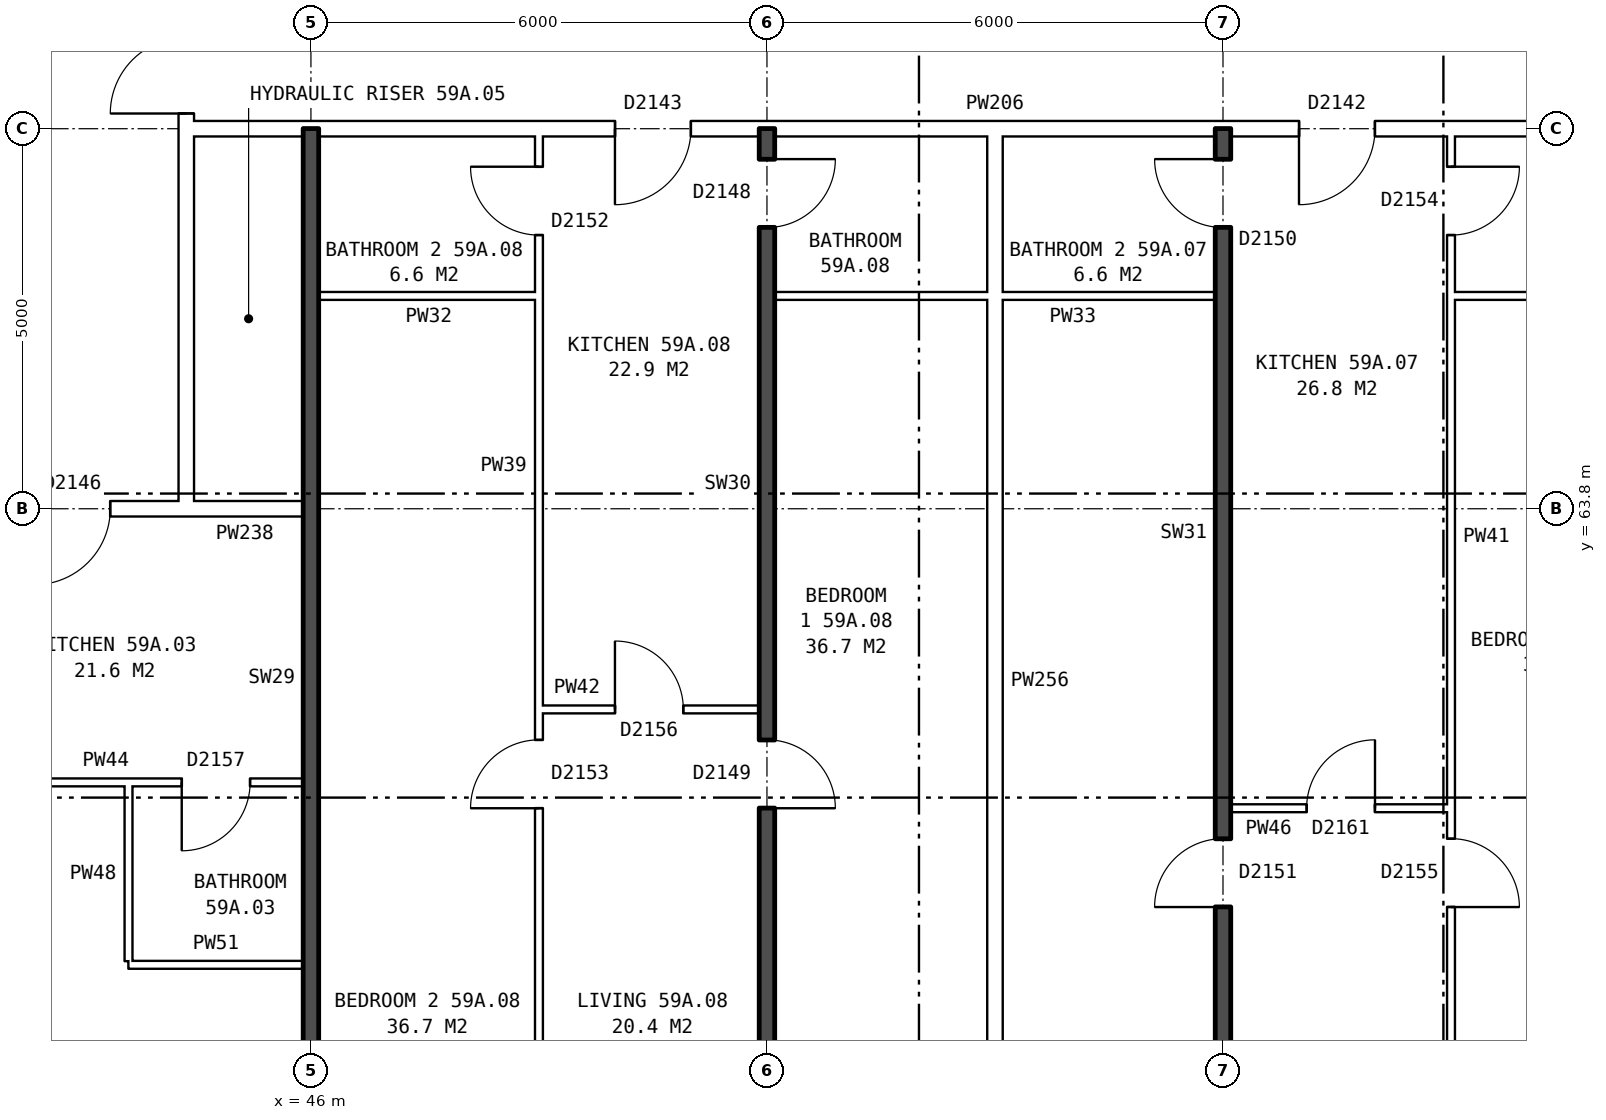
"""IFC4 building model, lengths in metres.
Left out: names, types, materials, properties, quantities, classifications, styles, units other than length and angle.
Written with IfcOpenShell. Run it as: python <this file> out.ifc"""

import sys

from ifc_helpers import new_model, si_unit, direction, frame, frame_2d, origin, place, context, subcontext, project, spatial, rectangle, extrude, element, fill, save


model = new_model("IFC4")
c1 = context("Model", 3, precision=1e-05, world=origin(), true_north=direction((0.0, 1.0)))
c2 = subcontext(c1, "Body", "Model", "MODEL_VIEW")
j1 = project(units=[si_unit("LENGTHUNIT", "METRE"), si_unit("PLANEANGLEUNIT", "RADIAN")], contexts=[c1])
p1 = place(None, origin())
s1 = spatial("IfcSite", under=j1, at=p1, CompositionType="ELEMENT")
p2 = place(p1, origin())
s2 = spatial("IfcBuilding", under=s1, at=p2, CompositionType="ELEMENT")
p3 = place(p2, frame((0.0, 0.0, 209.0)))
s3 = spatial("IfcBuildingStorey", under=s2, at=p3, CompositionType="ELEMENT", Elevation=209.0)
p4 = place(p3, frame((44.36, 63.9, 0.0), z_axis=(0.0, 0.0, 1.0), x_axis=(0.0, 1.0, 0.0)))
e1 = element("IfcWall", 1, at=p4, inside=s3, PredefinedType="PARTITIONING", context=c2, shape_type="SweptSolid", body=[
    extrude(rectangle(XDim=12.2, YDim=0.2, at=frame_2d((6.1, 0.0))), origin(), (0.0, 0.0, 1.0), 2.85),
])
p5 = place(p4, frame((5.1, 0.0, 0.0)))
e2 = element("IfcOpeningElement", 2, at=p5, cuts=e1, PredefinedType="OPENING", context=c2, shape_type="SweptSolid", body=[
    extrude(rectangle(XDim=2.0, YDim=2.1, at=frame_2d((1.0, 1.05))), frame((0.0, 0.11, 0.0), z_axis=(0.0, -1.0, 0.0), x_axis=(1.0, 0.0, 0.0)), (0.0, 0.0, 1.0), 0.22),
])
p6 = place(p3, frame((43.6, 57.8, 0.0), z_axis=(0.0, 0.0, 1.0), x_axis=(1.0, 0.0, 0.0)))
e3 = element("IfcWall", 3, at=p6, inside=s3, PredefinedType="PARTITIONING", context=c2, shape_type="SweptSolid", body=[
    extrude(rectangle(XDim=2.3, YDim=0.1, at=frame_2d((1.15, 0.0))), origin(), (0.0, 0.0, 1.0), 2.85),
])
p7 = place(p3, frame((58.1, 59.86, 0.0), z_axis=(0.0, 0.0, 1.0), x_axis=(1.0, 0.0, 0.0)))
e4 = element("IfcWall", 4, at=p7, inside=s3, PredefinedType="PARTITIONING", context=c2, shape_type="SweptSolid", body=[
    extrude(rectangle(XDim=2.9, YDim=0.1, at=frame_2d((1.45, 0.0))), origin(), (0.0, 0.0, 1.0), 2.85),
])
p8 = place(p7, frame((1.0, 0.0, 0.0)))
e5 = element("IfcOpeningElement", 5, at=p8, cuts=e4, PredefinedType="OPENING", context=c2, shape_type="SweptSolid", body=[
    extrude(rectangle(XDim=0.9, YDim=2.1, at=frame_2d((0.45, 1.05))), frame((0.0, 0.06, 0.0), z_axis=(0.0, -1.0, 0.0), x_axis=(1.0, 0.0, 0.0)), (0.0, 0.0, 1.0), 0.12),
])
p9 = place(p3, frame((40.1, 60.2, 0.0), z_axis=(0.0, 0.0, 1.0), x_axis=(1.0, 0.0, 0.0)))
e6 = element("IfcWall", 6, at=p9, inside=s3, PredefinedType="PARTITIONING", context=c2, shape_type="SweptSolid", body=[
    extrude(rectangle(XDim=5.8, YDim=0.1, at=frame_2d((2.9, 0.0))), origin(), (0.0, 0.0, 1.0), 2.85),
])
p10 = place(p9, frame((1.3, 0.0, 0.0)))
e7 = element("IfcOpeningElement", 7, at=p10, cuts=e6, PredefinedType="OPENING", context=c2, shape_type="SweptSolid", body=[
    extrude(rectangle(XDim=0.9, YDim=2.1, at=frame_2d((0.45, 1.05))), frame((0.0, 0.06, 0.0), z_axis=(0.0, -1.0, 0.0), x_axis=(1.0, 0.0, 0.0)), (0.0, 0.0, 1.0), 0.12),
])
p11 = place(p9, frame((4.2, 0.0, 0.0)))
e8 = element("IfcOpeningElement", 8, at=p11, cuts=e6, PredefinedType="OPENING", context=c2, shape_type="SweptSolid", body=[
    extrude(rectangle(XDim=0.9, YDim=2.1, at=frame_2d((0.45, 1.05))), frame((0.0, 0.06, 0.0), z_axis=(0.0, -1.0, 0.0), x_axis=(1.0, 0.0, 0.0)), (0.0, 0.0, 1.0), 0.12),
])
p12 = place(p3, frame((49.0, 61.16, 0.0), z_axis=(0.0, 0.0, 1.0), x_axis=(1.0, 0.0, 0.0)))
e9 = element("IfcWall", 9, at=p12, inside=s3, PredefinedType="PARTITIONING", context=c2, shape_type="SweptSolid", body=[
    extrude(rectangle(XDim=2.9, YDim=0.1, at=frame_2d((1.45, 0.0))), origin(), (0.0, 0.0, 1.0), 2.85),
])
p13 = place(p12, frame((1.0, 0.0, 0.0)))
e10 = element("IfcOpeningElement", 10, at=p13, cuts=e9, PredefinedType="OPENING", context=c2, shape_type="SweptSolid", body=[
    extrude(rectangle(XDim=0.9, YDim=2.1, at=frame_2d((0.45, 1.05))), frame((0.0, 0.06, 0.0), z_axis=(0.0, -1.0, 0.0), x_axis=(1.0, 0.0, 0.0)), (0.0, 0.0, 1.0), 0.12),
])
p14 = place(p3, frame((41.36, 63.8, 0.0), z_axis=(0.0, 0.0, 1.0), x_axis=(1.0, 0.0, 0.0)))
e11 = element("IfcWall", 11, at=p14, inside=s3, PredefinedType="PARTITIONING", context=c2, shape_type="SweptSolid", body=[
    extrude(rectangle(XDim=3.0, YDim=0.2, at=frame_2d((1.5, 0.0))), origin(), (0.0, 0.0, 1.0), 2.85),
])
p15 = place(p14, frame((1.0, 0.0, 0.0)))
e12 = element("IfcOpeningElement", 12, at=p15, cuts=e11, PredefinedType="OPENING", context=c2, shape_type="SweptSolid", body=[
    extrude(rectangle(XDim=1.0, YDim=2.1, at=frame_2d((0.5, 1.05))), frame((0.0, 0.11, 0.0), z_axis=(0.0, -1.0, 0.0), x_axis=(1.0, 0.0, 0.0)), (0.0, 0.0, 1.0), 0.22),
])
p16 = place(p3, frame((44.36, 63.8, 0.0), z_axis=(0.0, 0.0, 1.0), x_axis=(1.0, 0.0, 0.0)))
e13 = element("IfcWall", 13, at=p16, inside=s3, PredefinedType="PARTITIONING", context=c2, shape_type="SweptSolid", body=[
    extrude(rectangle(XDim=1.54, YDim=0.2, at=frame_2d((0.77, 0.0))), origin(), (0.0, 0.0, 1.0), 2.85),
])
p17 = place(p3, frame((46.1, 66.6, 0.0), z_axis=(0.0, 0.0, 1.0), x_axis=(1.0, 0.0, 0.0)))
e14 = element("IfcWall", 14, at=p17, inside=s3, PredefinedType="PARTITIONING", context=c2, shape_type="SweptSolid", body=[
    extrude(rectangle(XDim=2.9, YDim=0.1, at=frame_2d((1.45, 0.0))), origin(), (0.0, 0.0, 1.0), 2.85),
])
p18 = place(p3, frame((52.1, 66.6, 0.0), z_axis=(0.0, 0.0, 1.0), x_axis=(1.0, 0.0, 0.0)))
e15 = element("IfcWall", 15, at=p18, inside=s3, PredefinedType="PARTITIONING", context=c2, shape_type="SweptSolid", body=[
    extrude(rectangle(XDim=5.8, YDim=0.1, at=frame_2d((2.9, 0.0))), origin(), (0.0, 0.0, 1.0), 2.85),
])
p19 = place(p3, frame((61.0, 66.6, 0.0), z_axis=(0.0, 0.0, 1.0), x_axis=(1.0, 0.0, 0.0)))
e16 = element("IfcWall", 16, at=p19, inside=s3, PredefinedType="PARTITIONING", context=c2, shape_type="SweptSolid", body=[
    extrude(rectangle(XDim=2.64, YDim=0.1, at=frame_2d((1.32, 0.0))), origin(), (0.0, 0.0, 1.0), 2.85),
])
p20 = place(p3, frame((44.36, 68.8, 0.0), z_axis=(0.0, 0.0, 1.0), x_axis=(1.0, 0.0, 0.0)))
e17 = element("IfcWall", 17, at=p20, inside=s3, PredefinedType="PARTITIONING", context=c2, shape_type="SweptSolid", body=[
    extrude(rectangle(XDim=19.28, YDim=0.2, at=frame_2d((9.64, 0.0))), origin(), (0.0, 0.0, 1.0), 2.85),
])
p21 = place(p20, frame((14.64, 0.0, 0.0)))
e18 = element("IfcOpeningElement", 18, at=p21, cuts=e17, PredefinedType="OPENING", context=c2, shape_type="SweptSolid", body=[
    extrude(rectangle(XDim=1.0, YDim=2.1, at=frame_2d((0.5, 1.05))), frame((0.0, 0.11, 0.0), z_axis=(0.0, -1.0, 0.0), x_axis=(1.0, 0.0, 0.0)), (0.0, 0.0, 1.0), 0.22),
])
p22 = place(p20, frame((5.64, 0.0, 0.0)))
e19 = element("IfcOpeningElement", 19, at=p22, cuts=e17, PredefinedType="OPENING", context=c2, shape_type="SweptSolid", body=[
    extrude(rectangle(XDim=1.0, YDim=2.1, at=frame_2d((0.5, 1.05))), frame((0.0, 0.11, 0.0), z_axis=(0.0, -1.0, 0.0), x_axis=(1.0, 0.0, 0.0)), (0.0, 0.0, 1.0), 0.22),
])
p23 = place(p3, frame((43.6, 57.85, 0.0), z_axis=(0.0, 0.0, 1.0), x_axis=(0.0, 1.0, 0.0)))
e20 = element("IfcWall", 20, at=p23, inside=s3, PredefinedType="PARTITIONING", context=c2, shape_type="SweptSolid", body=[
    extrude(rectangle(XDim=2.3, YDim=0.1, at=frame_2d((1.15, 0.0))), origin(), (0.0, 0.0, 1.0), 2.85),
])
p24 = place(p3, frame((46.0, 54.36, 0.0), z_axis=(0.0, 0.0, 1.0), x_axis=(0.0, 1.0, 0.0)))
e21 = element("IfcWall", 21, at=p24, inside=s3, PredefinedType="SOLIDWALL", context=c2, shape_type="SweptSolid", body=[
    extrude(rectangle(XDim=14.44, YDim=0.2, at=frame_2d((7.22, 0.0))), origin(), (0.0, 0.0, 1.0), 2.85),
])
p25 = place(p3, frame((49.0, 54.36, 0.0), z_axis=(0.0, 0.0, 1.0), x_axis=(0.0, 1.0, 0.0)))
e22 = element("IfcWall", 22, at=p25, inside=s3, PredefinedType="PARTITIONING", context=c2, shape_type="SweptSolid", body=[
    extrude(rectangle(XDim=14.34, YDim=0.1, at=frame_2d((7.17, 0.0))), origin(), (0.0, 0.0, 1.0), 2.85),
])
p26 = place(p25, frame((5.5, 0.0, 0.0)))
e23 = element("IfcOpeningElement", 23, at=p26, cuts=e22, PredefinedType="OPENING", context=c2, shape_type="SweptSolid", body=[
    extrude(rectangle(XDim=0.9, YDim=2.1, at=frame_2d((0.45, 1.05))), frame((0.0, 0.06, 0.0), z_axis=(0.0, -1.0, 0.0), x_axis=(1.0, 0.0, 0.0)), (0.0, 0.0, 1.0), 0.12),
])
p27 = place(p25, frame((13.04, 0.0, 0.0)))
e24 = element("IfcOpeningElement", 24, at=p27, cuts=e22, PredefinedType="OPENING", context=c2, shape_type="SweptSolid", body=[
    extrude(rectangle(XDim=0.9, YDim=2.1, at=frame_2d((0.45, 1.05))), frame((0.0, 0.06, 0.0), z_axis=(0.0, -1.0, 0.0), x_axis=(1.0, 0.0, 0.0)), (0.0, 0.0, 1.0), 0.12),
])
p28 = place(p3, frame((52.0, 54.36, 0.0), z_axis=(0.0, 0.0, 1.0), x_axis=(0.0, 1.0, 0.0)))
e25 = element("IfcWall", 25, at=p28, inside=s3, PredefinedType="SOLIDWALL", context=c2, shape_type="SweptSolid", body=[
    extrude(rectangle(XDim=14.44, YDim=0.2, at=frame_2d((7.22, 0.0))), origin(), (0.0, 0.0, 1.0), 2.85),
])
p29 = place(p28, frame((5.5, 0.0, 0.0)))
e26 = element("IfcOpeningElement", 26, at=p29, cuts=e25, PredefinedType="OPENING", context=c2, shape_type="SweptSolid", body=[
    extrude(rectangle(XDim=0.9, YDim=2.1, at=frame_2d((0.45, 1.05))), frame((0.0, 0.11, 0.0), z_axis=(0.0, -1.0, 0.0), x_axis=(1.0, 0.0, 0.0)), (0.0, 0.0, 1.0), 0.22),
])
p30 = place(p28, frame((13.14, 0.0, 0.0)))
e27 = element("IfcOpeningElement", 27, at=p30, cuts=e25, PredefinedType="OPENING", context=c2, shape_type="SweptSolid", body=[
    extrude(rectangle(XDim=0.9, YDim=2.1, at=frame_2d((0.45, 1.05))), frame((0.0, 0.11, 0.0), z_axis=(0.0, -1.0, 0.0), x_axis=(1.0, 0.0, 0.0)), (0.0, 0.0, 1.0), 0.22),
])
p31 = place(p3, frame((55.0, 54.36, 0.0), z_axis=(0.0, 0.0, 1.0), x_axis=(0.0, 1.0, 0.0)))
e28 = element("IfcWall", 28, at=p31, inside=s3, PredefinedType="PARTITIONING", context=c2, shape_type="SweptSolid", body=[
    extrude(rectangle(XDim=14.34, YDim=0.2, at=frame_2d((7.17, 0.0))), origin(), (0.0, 0.0, 1.0), 2.85),
])
p32 = place(p3, frame((58.0, 54.36, 0.0), z_axis=(0.0, 0.0, 1.0), x_axis=(0.0, 1.0, 0.0)))
e29 = element("IfcWall", 29, at=p32, inside=s3, PredefinedType="SOLIDWALL", context=c2, shape_type="SweptSolid", body=[
    extrude(rectangle(XDim=14.44, YDim=0.2, at=frame_2d((7.22, 0.0))), origin(), (0.0, 0.0, 1.0), 2.85),
])
p33 = place(p32, frame((4.2, 0.0, 0.0)))
e30 = element("IfcOpeningElement", 30, at=p33, cuts=e29, PredefinedType="OPENING", context=c2, shape_type="SweptSolid", body=[
    extrude(rectangle(XDim=0.9, YDim=2.1, at=frame_2d((0.45, 1.05))), frame((0.0, 0.11, 0.0), z_axis=(0.0, -1.0, 0.0), x_axis=(1.0, 0.0, 0.0)), (0.0, 0.0, 1.0), 0.22),
])
p34 = place(p32, frame((13.14, 0.0, 0.0)))
e31 = element("IfcOpeningElement", 31, at=p34, cuts=e29, PredefinedType="OPENING", context=c2, shape_type="SweptSolid", body=[
    extrude(rectangle(XDim=0.9, YDim=2.1, at=frame_2d((0.45, 1.05))), frame((0.0, 0.11, 0.0), z_axis=(0.0, -1.0, 0.0), x_axis=(1.0, 0.0, 0.0)), (0.0, 0.0, 1.0), 0.22),
])
p35 = place(p3, frame((61.0, 54.36, 0.0), z_axis=(0.0, 0.0, 1.0), x_axis=(0.0, 1.0, 0.0)))
e32 = element("IfcWall", 32, at=p35, inside=s3, PredefinedType="PARTITIONING", context=c2, shape_type="SweptSolid", body=[
    extrude(rectangle(XDim=14.34, YDim=0.1, at=frame_2d((7.17, 0.0))), origin(), (0.0, 0.0, 1.0), 2.85),
])
p36 = place(p35, frame((4.2, 0.0, 0.0)))
e33 = element("IfcOpeningElement", 33, at=p36, cuts=e32, PredefinedType="OPENING", context=c2, shape_type="SweptSolid", body=[
    extrude(rectangle(XDim=0.9, YDim=2.1, at=frame_2d((0.45, 1.05))), frame((0.0, 0.06, 0.0), z_axis=(0.0, -1.0, 0.0), x_axis=(1.0, 0.0, 0.0)), (0.0, 0.0, 1.0), 0.12),
])
p37 = place(p35, frame((13.04, 0.0, 0.0)))
e34 = element("IfcOpeningElement", 34, at=p37, cuts=e32, PredefinedType="OPENING", context=c2, shape_type="SweptSolid", body=[
    extrude(rectangle(XDim=0.9, YDim=2.1, at=frame_2d((0.45, 1.05))), frame((0.0, 0.06, 0.0), z_axis=(0.0, -1.0, 0.0), x_axis=(1.0, 0.0, 0.0)), (0.0, 0.0, 1.0), 0.12),
])
p38 = place(p5, origin())
e35 = element("IfcDoor", 35, at=p38, inside=s3, OperationType="DOUBLE_DOOR_SINGLE_SWING", PredefinedType="DOOR", context=c2, shape_type="SweptSolid", body=[
    extrude(rectangle(XDim=2.0, YDim=2.1, at=frame_2d((1.0, 1.05))), frame((0.0, 0.025, 0.0), z_axis=(0.0, -1.0, 0.0), x_axis=(1.0, 0.0, 0.0)), (0.0, 0.0, 1.0), 0.05),
])
fill(e2, e35)
p39 = place(p15, frame((1.0, 0.0, 0.0), z_axis=(0.0, 0.0, 1.0), x_axis=(-1.0, 0.0, 0.0)))
e36 = element("IfcDoor", 36, at=p39, inside=s3, OperationType="SINGLE_SWING_RIGHT", PredefinedType="DOOR", context=c2, shape_type="SweptSolid", body=[
    extrude(rectangle(XDim=1.0, YDim=2.1, at=frame_2d((0.5, 1.05))), frame((0.0, 0.025, 0.0), z_axis=(0.0, -1.0, 0.0), x_axis=(1.0, 0.0, 0.0)), (0.0, 0.0, 1.0), 0.05),
])
fill(e12, e36)
p40 = place(p11, frame((0.9, 0.0, 0.0), z_axis=(0.0, 0.0, 1.0), x_axis=(-1.0, 0.0, 0.0)))
e37 = element("IfcDoor", 37, at=p40, inside=s3, OperationType="SINGLE_SWING_RIGHT", PredefinedType="DOOR", context=c2, shape_type="SweptSolid", body=[
    extrude(rectangle(XDim=0.9, YDim=2.1, at=frame_2d((0.45, 1.05))), frame((0.0, 0.025, 0.0), z_axis=(0.0, -1.0, 0.0), x_axis=(1.0, 0.0, 0.0)), (0.0, 0.0, 1.0), 0.05),
])
fill(e8, e37)
p41 = place(p36, frame((0.9, 0.0, 0.0), z_axis=(0.0, 0.0, 1.0), x_axis=(-1.0, 0.0, 0.0)))
e38 = element("IfcDoor", 38, at=p41, inside=s3, OperationType="SINGLE_SWING_RIGHT", PredefinedType="DOOR", context=c2, shape_type="SweptSolid", body=[
    extrude(rectangle(XDim=0.9, YDim=2.1, at=frame_2d((0.45, 1.05))), frame((0.0, 0.025, 0.0), z_axis=(0.0, -1.0, 0.0), x_axis=(1.0, 0.0, 0.0)), (0.0, 0.0, 1.0), 0.05),
])
fill(e33, e38)
p42 = place(p33, origin())
e39 = element("IfcDoor", 39, at=p42, inside=s3, OperationType="SINGLE_SWING_LEFT", PredefinedType="DOOR", context=c2, shape_type="SweptSolid", body=[
    extrude(rectangle(XDim=0.9, YDim=2.1, at=frame_2d((0.45, 1.05))), frame((0.0, 0.025, 0.0), z_axis=(0.0, -1.0, 0.0), x_axis=(1.0, 0.0, 0.0)), (0.0, 0.0, 1.0), 0.05),
])
fill(e30, e39)
p43 = place(p21, frame((1.0, 0.0, 0.0), z_axis=(0.0, 0.0, 1.0), x_axis=(-1.0, 0.0, 0.0)))
e40 = element("IfcDoor", 40, at=p43, inside=s3, OperationType="SINGLE_SWING_RIGHT", PredefinedType="DOOR", context=c2, shape_type="SweptSolid", body=[
    extrude(rectangle(XDim=1.0, YDim=2.1, at=frame_2d((0.5, 1.05))), frame((0.0, 0.025, 0.0), z_axis=(0.0, -1.0, 0.0), x_axis=(1.0, 0.0, 0.0)), (0.0, 0.0, 1.0), 0.05),
])
fill(e18, e40)
p44 = place(p8, origin())
e41 = element("IfcDoor", 41, at=p44, inside=s3, OperationType="SINGLE_SWING_RIGHT", PredefinedType="DOOR", context=c2, shape_type="SweptSolid", body=[
    extrude(rectangle(XDim=0.9, YDim=2.1, at=frame_2d((0.45, 1.05))), frame((0.0, 0.025, 0.0), z_axis=(0.0, -1.0, 0.0), x_axis=(1.0, 0.0, 0.0)), (0.0, 0.0, 1.0), 0.05),
])
fill(e5, e41)
p45 = place(p37, frame((0.9, 0.0, 0.0), z_axis=(0.0, 0.0, 1.0), x_axis=(-1.0, 0.0, 0.0)))
e42 = element("IfcDoor", 42, at=p45, inside=s3, OperationType="SINGLE_SWING_LEFT", PredefinedType="DOOR", context=c2, shape_type="SweptSolid", body=[
    extrude(rectangle(XDim=0.9, YDim=2.1, at=frame_2d((0.45, 1.05))), frame((0.0, 0.025, 0.0), z_axis=(0.0, -1.0, 0.0), x_axis=(1.0, 0.0, 0.0)), (0.0, 0.0, 1.0), 0.05),
])
fill(e34, e42)
p46 = place(p34, origin())
e43 = element("IfcDoor", 43, at=p46, inside=s3, OperationType="SINGLE_SWING_RIGHT", PredefinedType="DOOR", context=c2, shape_type="SweptSolid", body=[
    extrude(rectangle(XDim=0.9, YDim=2.1, at=frame_2d((0.45, 1.05))), frame((0.0, 0.025, 0.0), z_axis=(0.0, -1.0, 0.0), x_axis=(1.0, 0.0, 0.0)), (0.0, 0.0, 1.0), 0.05),
])
fill(e31, e43)
p47 = place(p29, frame((0.9, 0.0, 0.0), z_axis=(0.0, 0.0, 1.0), x_axis=(-1.0, 0.0, 0.0)))
e44 = element("IfcDoor", 44, at=p47, inside=s3, OperationType="SINGLE_SWING_RIGHT", PredefinedType="DOOR", context=c2, shape_type="SweptSolid", body=[
    extrude(rectangle(XDim=0.9, YDim=2.1, at=frame_2d((0.45, 1.05))), frame((0.0, 0.025, 0.0), z_axis=(0.0, -1.0, 0.0), x_axis=(1.0, 0.0, 0.0)), (0.0, 0.0, 1.0), 0.05),
])
fill(e26, e44)
p48 = place(p26, origin())
e45 = element("IfcDoor", 45, at=p48, inside=s3, OperationType="SINGLE_SWING_LEFT", PredefinedType="DOOR", context=c2, shape_type="SweptSolid", body=[
    extrude(rectangle(XDim=0.9, YDim=2.1, at=frame_2d((0.45, 1.05))), frame((0.0, 0.025, 0.0), z_axis=(0.0, -1.0, 0.0), x_axis=(1.0, 0.0, 0.0)), (0.0, 0.0, 1.0), 0.05),
])
fill(e23, e45)
p49 = place(p22, frame((1.0, 0.0, 0.0), z_axis=(0.0, 0.0, 1.0), x_axis=(-1.0, 0.0, 0.0)))
e46 = element("IfcDoor", 46, at=p49, inside=s3, OperationType="SINGLE_SWING_RIGHT", PredefinedType="DOOR", context=c2, shape_type="SweptSolid", body=[
    extrude(rectangle(XDim=1.0, YDim=2.1, at=frame_2d((0.5, 1.05))), frame((0.0, 0.025, 0.0), z_axis=(0.0, -1.0, 0.0), x_axis=(1.0, 0.0, 0.0)), (0.0, 0.0, 1.0), 0.05),
])
fill(e19, e46)
p50 = place(p13, origin())
e47 = element("IfcDoor", 47, at=p50, inside=s3, OperationType="SINGLE_SWING_LEFT", PredefinedType="DOOR", context=c2, shape_type="SweptSolid", body=[
    extrude(rectangle(XDim=0.9, YDim=2.1, at=frame_2d((0.45, 1.05))), frame((0.0, 0.025, 0.0), z_axis=(0.0, -1.0, 0.0), x_axis=(1.0, 0.0, 0.0)), (0.0, 0.0, 1.0), 0.05),
])
fill(e10, e47)
p51 = place(p30, frame((0.9, 0.0, 0.0), z_axis=(0.0, 0.0, 1.0), x_axis=(-1.0, 0.0, 0.0)))
e48 = element("IfcDoor", 48, at=p51, inside=s3, OperationType="SINGLE_SWING_LEFT", PredefinedType="DOOR", context=c2, shape_type="SweptSolid", body=[
    extrude(rectangle(XDim=0.9, YDim=2.1, at=frame_2d((0.45, 1.05))), frame((0.0, 0.025, 0.0), z_axis=(0.0, -1.0, 0.0), x_axis=(1.0, 0.0, 0.0)), (0.0, 0.0, 1.0), 0.05),
])
fill(e27, e48)
p52 = place(p27, origin())
e49 = element("IfcDoor", 49, at=p52, inside=s3, OperationType="SINGLE_SWING_RIGHT", PredefinedType="DOOR", context=c2, shape_type="SweptSolid", body=[
    extrude(rectangle(XDim=0.9, YDim=2.1, at=frame_2d((0.45, 1.05))), frame((0.0, 0.025, 0.0), z_axis=(0.0, -1.0, 0.0), x_axis=(1.0, 0.0, 0.0)), (0.0, 0.0, 1.0), 0.05),
])
fill(e24, e49)
save(model, sys.argv[1])
